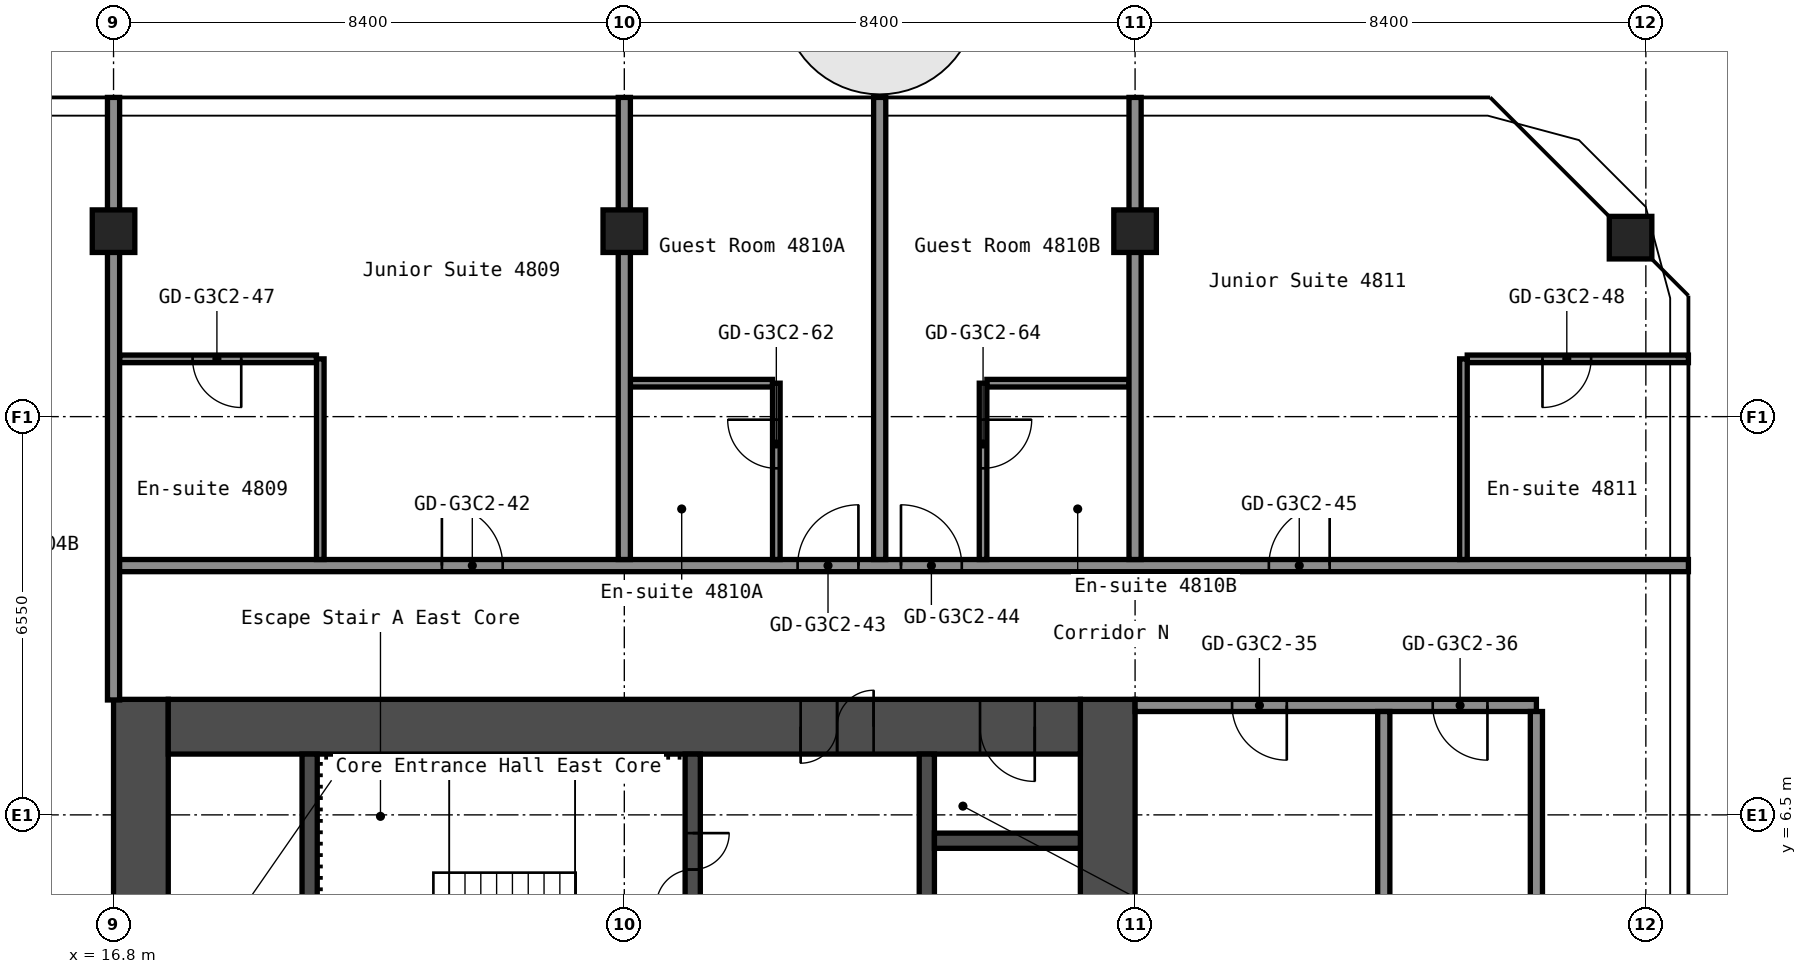
"""IFC4 building model, lengths in metres.
Left out: names, types, materials, properties, quantities, classifications, styles, units other than length and angle.
Written with IfcOpenShell. Run it as: python <this file> out.ifc"""

import sys

from ifc_helpers import new_model, si_unit, direction, frame, frame_2d, origin, origin_2d, place, context, subcontext, project, spatial, rectangle, hollow_rectangle, extrude, element, fill, save


model = new_model("IFC4")
c1 = context("Model", 3, precision=1e-05, world=origin(), true_north=direction((0.0, 1.0)))
c2 = subcontext(c1, "Body", "Model", "MODEL_VIEW")
j1 = project(units=[si_unit("LENGTHUNIT", "METRE"), si_unit("PLANEANGLEUNIT", "RADIAN")], contexts=[c1])
p1 = place(None, origin())
s1 = spatial("IfcSite", under=j1, at=p1, CompositionType="ELEMENT")
p2 = place(p1, origin())
s2 = spatial("IfcBuilding", under=s1, at=p2, CompositionType="ELEMENT")
p3 = place(p2, frame((0.0, 0.0, 169.4)))
s3 = spatial("IfcBuildingStorey", under=s2, at=p3, CompositionType="ELEMENT", Elevation=169.4)
for number, where, z_axis, x_axis in (
    (1, (16.8, 16.1, 0.0), (0.0, 0.0, 1.0), (1.0, 0.0, 0.0)),
    (2, (25.2, 16.1, 0.0), (0.0, 0.0, 1.0), (1.0, 0.0, 0.0)),
    (3, (33.6, 16.1, 0.0), (0.0, 0.0, 1.0), (1.0, 0.0, 0.0)),
    (4, (41.749, 15.994, 0.0), (0.0, 0.0, 1.0), (1.0, 0.0, 0.0)),
):
    element("IfcColumn", number, at=place(p3, frame(where, z_axis=z_axis, x_axis=x_axis)), inside=s3, PredefinedType="COLUMN", context=c2, shape_type="SweptSolid", body=[
        extrude(hollow_rectangle(XDim=0.7, YDim=0.7, WallThickness=0.028, at=origin_2d()), origin(), (0.0, 0.0, 1.0), 2.75),
    ])
p4 = place(p3, frame((17.25, -8.4, 0.0), z_axis=(0.0, 0.0, 1.0), x_axis=(0.0, 1.0, 0.0)))
e5 = element("IfcWall", 5, at=p4, inside=s3, PredefinedType="SHEAR", context=c2, shape_type="SweptSolid", body=[
    extrude(rectangle(XDim=16.8, YDim=0.9, at=frame_2d((8.4, 0.0))), origin(), (0.0, 0.0, 1.0), 2.75),
])
p5 = place(p4, frame((7.1, 0.0, 0.0)))
e6 = element("IfcOpeningElement", 6, at=p5, cuts=e5, PredefinedType="OPENING", context=c2, shape_type="SweptSolid", body=[
    extrude(rectangle(XDim=1.6, YDim=2.1, at=frame_2d((0.8, 1.05))), frame((0.0, 0.46, 0.0), z_axis=(0.0, -1.0, 0.0), x_axis=(1.0, 0.0, 0.0)), (0.0, 0.0, 1.0), 0.92),
])
p6 = place(p3, frame((33.15, -8.4, 0.0), z_axis=(0.0, 0.0, 1.0), x_axis=(0.0, 1.0, 0.0)))
e7 = element("IfcWall", 7, at=p6, inside=s3, PredefinedType="SHEAR", context=c2, shape_type="SweptSolid", body=[
    extrude(rectangle(XDim=16.8, YDim=0.9, at=frame_2d((8.4, 0.0))), origin(), (0.0, 0.0, 1.0), 2.75),
])
p7 = place(p3, frame((17.7, 7.95, 0.0), z_axis=(0.0, 0.0, 1.0), x_axis=(1.0, 0.0, 0.0)))
e8 = element("IfcWall", 8, at=p7, inside=s3, PredefinedType="SHEAR", context=c2, shape_type="SweptSolid", body=[
    extrude(rectangle(XDim=15.0, YDim=0.9, at=frame_2d((7.5, 0.0))), origin(), (0.0, 0.0, 1.0), 2.75),
])
p8 = place(p7, frame((10.4, 0.0, 0.0)))
e9 = element("IfcOpeningElement", 9, at=p8, cuts=e8, PredefinedType="OPENING", context=c2, shape_type="SweptSolid", body=[
    extrude(rectangle(XDim=1.2, YDim=2.1, at=frame_2d((0.6, 1.05))), frame((0.0, 0.46, 0.0), z_axis=(0.0, -1.0, 0.0), x_axis=(1.0, 0.0, 0.0)), (0.0, 0.0, 1.0), 0.92),
])
p9 = place(p7, frame((13.35, 0.0, 0.0)))
e10 = element("IfcOpeningElement", 10, at=p9, cuts=e8, PredefinedType="OPENING", context=c2, shape_type="SweptSolid", body=[
    extrude(rectangle(XDim=0.9, YDim=2.1, at=frame_2d((0.45, 1.05))), frame((0.0, 0.46, 0.0), z_axis=(0.0, -1.0, 0.0), x_axis=(1.0, 0.0, 0.0)), (0.0, 0.0, 1.0), 0.92),
])
p10 = place(p3, frame((20.025, 1.2, 0.0), z_axis=(0.0, 0.0, 1.0), x_axis=(0.0, 1.0, 0.0)))
e11 = element("IfcWall", 11, at=p10, inside=s3, PredefinedType="SHEAR", context=c2, shape_type="SweptSolid", body=[
    extrude(rectangle(XDim=6.3, YDim=0.25, at=frame_2d((3.15, 0.0))), origin(), (0.0, 0.0, 1.0), 2.75),
])
p11 = place(p3, frame((26.325, 3.75, 0.0), z_axis=(0.0, 0.0, 1.0), x_axis=(0.0, 1.0, 0.0)))
e12 = element("IfcWall", 12, at=p11, inside=s3, PredefinedType="SHEAR", context=c2, shape_type="SweptSolid", body=[
    extrude(rectangle(XDim=3.75, YDim=0.25, at=frame_2d((1.875, 0.0))), origin(), (0.0, 0.0, 1.0), 2.75),
])
p12 = place(p11, frame((1.25, 0.0, 0.0)))
e13 = element("IfcOpeningElement", 13, at=p12, cuts=e12, PredefinedType="OPENING", context=c2, shape_type="SweptSolid", body=[
    extrude(rectangle(XDim=1.2, YDim=2.1, at=frame_2d((0.6, 1.05))), frame((0.0, 0.135, 0.0), z_axis=(0.0, -1.0, 0.0), x_axis=(1.0, 0.0, 0.0)), (0.0, 0.0, 1.0), 0.27),
])
p13 = place(p3, frame((30.175, 1.45, 0.0), z_axis=(0.0, 0.0, 1.0), x_axis=(0.0, 1.0, 0.0)))
e14 = element("IfcWall", 14, at=p13, inside=s3, PredefinedType="SHEAR", context=c2, shape_type="SweptSolid", body=[
    extrude(rectangle(XDim=6.05, YDim=0.25, at=frame_2d((3.025, 0.0))), origin(), (0.0, 0.0, 1.0), 2.75),
])
p14 = place(p13, frame((2.625, 0.0, 0.0)))
e15 = element("IfcOpeningElement", 15, at=p14, cuts=e14, PredefinedType="OPENING", context=c2, shape_type="SweptSolid", body=[
    extrude(rectangle(XDim=1.1, YDim=2.1, at=frame_2d((0.55, 1.05))), frame((0.0, 0.135, 0.0), z_axis=(0.0, -1.0, 0.0), x_axis=(1.0, 0.0, 0.0)), (0.0, 0.0, 1.0), 0.27),
])
p15 = place(p3, frame((30.3, 6.075, 0.0), z_axis=(0.0, 0.0, 1.0), x_axis=(1.0, 0.0, 0.0)))
e16 = element("IfcWall", 16, at=p15, inside=s3, PredefinedType="SHEAR", context=c2, shape_type="SweptSolid", body=[
    extrude(rectangle(XDim=2.4, YDim=0.25, at=frame_2d((1.2, 0.0))), origin(), (0.0, 0.0, 1.0), 2.75),
])
p16 = place(p3, frame((33.6, 8.3, 0.0), z_axis=(0.0, 0.0, 1.0), x_axis=(1.0, 0.0, 0.0)))
e17 = element("IfcWall", 17, at=p16, inside=s3, PredefinedType="PARTITIONING", context=c2, shape_type="SweptSolid", body=[
    extrude(rectangle(XDim=6.6, YDim=0.2, at=frame_2d((3.3, 0.0))), origin(), (0.0, 0.0, 1.0), 2.75),
])
p17 = place(p16, frame((1.595, 0.0, 0.0)))
e18 = element("IfcOpeningElement", 18, at=p17, cuts=e17, PredefinedType="OPENING", context=c2, shape_type="SweptSolid", body=[
    extrude(rectangle(XDim=0.9, YDim=2.1, at=frame_2d((0.45, 1.05))), frame((0.0, 0.11, 0.0), z_axis=(0.0, -1.0, 0.0), x_axis=(1.0, 0.0, 0.0)), (0.0, 0.0, 1.0), 0.22),
])
p18 = place(p16, frame((4.895, 0.0, 0.0)))
e19 = element("IfcOpeningElement", 19, at=p18, cuts=e17, PredefinedType="OPENING", context=c2, shape_type="SweptSolid", body=[
    extrude(rectangle(XDim=0.9, YDim=2.1, at=frame_2d((0.45, 1.05))), frame((0.0, 0.11, 0.0), z_axis=(0.0, -1.0, 0.0), x_axis=(1.0, 0.0, 0.0)), (0.0, 0.0, 1.0), 0.22),
])
p19 = place(p3, frame((16.8, 10.6, 0.0), z_axis=(0.0, 0.0, 1.0), x_axis=(1.0, 0.0, 0.0)))
e20 = element("IfcWall", 20, at=p19, inside=s3, PredefinedType="PARTITIONING", context=c2, shape_type="SweptSolid", body=[
    extrude(rectangle(XDim=25.9, YDim=0.2, at=frame_2d((12.95, 0.0))), origin(), (0.0, 0.0, 1.0), 2.75),
])
p20 = place(p19, frame((5.4, 0.0, 0.0)))
e21 = element("IfcOpeningElement", 21, at=p20, cuts=e20, PredefinedType="OPENING", context=c2, shape_type="SweptSolid", body=[
    extrude(rectangle(XDim=1.0, YDim=2.1, at=frame_2d((0.5, 1.05))), frame((0.0, 0.11, 0.0), z_axis=(0.0, -1.0, 0.0), x_axis=(1.0, 0.0, 0.0)), (0.0, 0.0, 1.0), 0.22),
])
p21 = place(p19, frame((11.25, 0.0, 0.0)))
e22 = element("IfcOpeningElement", 22, at=p21, cuts=e20, PredefinedType="OPENING", context=c2, shape_type="SweptSolid", body=[
    extrude(rectangle(XDim=1.0, YDim=2.1, at=frame_2d((0.5, 1.05))), frame((0.0, 0.11, 0.0), z_axis=(0.0, -1.0, 0.0), x_axis=(1.0, 0.0, 0.0)), (0.0, 0.0, 1.0), 0.22),
])
p22 = place(p19, frame((12.95, 0.0, 0.0)))
e23 = element("IfcOpeningElement", 23, at=p22, cuts=e20, PredefinedType="OPENING", context=c2, shape_type="SweptSolid", body=[
    extrude(rectangle(XDim=1.0, YDim=2.1, at=frame_2d((0.5, 1.05))), frame((0.0, 0.11, 0.0), z_axis=(0.0, -1.0, 0.0), x_axis=(1.0, 0.0, 0.0)), (0.0, 0.0, 1.0), 0.22),
])
p23 = place(p19, frame((19.0, 0.0, 0.0)))
e24 = element("IfcOpeningElement", 24, at=p23, cuts=e20, PredefinedType="OPENING", context=c2, shape_type="SweptSolid", body=[
    extrude(rectangle(XDim=1.0, YDim=2.1, at=frame_2d((0.5, 1.05))), frame((0.0, 0.11, 0.0), z_axis=(0.0, -1.0, 0.0), x_axis=(1.0, 0.0, 0.0)), (0.0, 0.0, 1.0), 0.22),
])
for number, where, z_axis, x_axis in (
    (25, (25.3, 13.6, 0.0), (0.0, 0.0, 1.0), (1.0, 0.0, 0.0)),
    (26, (31.163, 13.6, 0.0), (0.0, 0.0, 1.0), (1.0, 0.0, 0.0)),
):
    element("IfcWall", number, at=place(p3, frame(where, z_axis=z_axis, x_axis=x_axis)), inside=s3, PredefinedType="PARTITIONING", context=c2, shape_type="SweptSolid", body=[
        extrude(rectangle(XDim=2.337, YDim=0.125, at=frame_2d((1.169, 0.0))), origin(), (0.0, 0.0, 1.0), 2.75),
    ])
p24 = place(p3, frame((16.9, 14.0, 0.0), z_axis=(0.0, 0.0, 1.0), x_axis=(1.0, 0.0, 0.0)))
e27 = element("IfcWall", 27, at=p24, inside=s3, PredefinedType="PARTITIONING", context=c2, shape_type="SweptSolid", body=[
    extrude(rectangle(XDim=3.238, YDim=0.125, at=frame_2d((1.619, 0.0))), origin(), (0.0, 0.0, 1.0), 2.75),
])
p25 = place(p24, frame((1.2, 0.0, 0.0)))
e28 = element("IfcOpeningElement", 28, at=p25, cuts=e27, PredefinedType="OPENING", context=c2, shape_type="SweptSolid", body=[
    extrude(rectangle(XDim=0.8, YDim=2.1, at=frame_2d((0.4, 1.05))), frame((0.0, 0.073, 0.0), z_axis=(0.0, -1.0, 0.0), x_axis=(1.0, 0.0, 0.0)), (0.0, 0.0, 1.0), 0.145),
])
p26 = place(p3, frame((39.062, 14.0, 0.0), z_axis=(0.0, 0.0, 1.0), x_axis=(1.0, 0.0, 0.0)))
e29 = element("IfcWall", 29, at=p26, inside=s3, PredefinedType="PARTITIONING", context=c2, shape_type="SweptSolid", body=[
    extrude(rectangle(XDim=3.637, YDim=0.125, at=frame_2d((1.819, 0.0))), origin(), (0.0, 0.0, 1.0), 2.75),
])
p27 = place(p26, frame((1.238, 0.0, 0.0)))
e30 = element("IfcOpeningElement", 30, at=p27, cuts=e29, PredefinedType="OPENING", context=c2, shape_type="SweptSolid", body=[
    extrude(rectangle(XDim=0.8, YDim=2.1, at=frame_2d((0.4, 1.05))), frame((0.0, 0.073, 0.0), z_axis=(0.0, -1.0, 0.0), x_axis=(1.0, 0.0, 0.0)), (0.0, 0.0, 1.0), 0.145),
])
p28 = place(p3, frame((16.8, 8.39, 0.0), z_axis=(0.0, 0.0, 1.0), x_axis=(0.0, 1.0, 0.0)))
e31 = element("IfcWall", 31, at=p28, inside=s3, PredefinedType="PARTITIONING", context=c2, shape_type="SweptSolid", body=[
    extrude(rectangle(XDim=9.91, YDim=0.2, at=frame_2d((4.955, 0.0))), origin(), (0.0, 0.0, 1.0), 2.75),
])
p29 = place(p3, frame((20.2, 10.7, 0.0), z_axis=(0.0, 0.0, 1.0), x_axis=(0.0, 1.0, 0.0)))
e32 = element("IfcWall", 32, at=p29, inside=s3, PredefinedType="PARTITIONING", context=c2, shape_type="SweptSolid", body=[
    extrude(rectangle(XDim=3.3, YDim=0.125, at=frame_2d((1.65, 0.0))), origin(), (0.0, 0.0, 1.0), 2.75),
])
p30 = place(p3, frame((25.2, 10.7, 0.0), z_axis=(0.0, 0.0, 1.0), x_axis=(0.0, 1.0, 0.0)))
e33 = element("IfcWall", 33, at=p30, inside=s3, PredefinedType="PARTITIONING", context=c2, shape_type="SweptSolid", body=[
    extrude(rectangle(XDim=7.6, YDim=0.2, at=frame_2d((3.8, 0.0))), origin(), (0.0, 0.0, 1.0), 2.75),
])
p31 = place(p3, frame((27.7, 10.7, 0.0), z_axis=(0.0, 0.0, 1.0), x_axis=(0.0, 1.0, 0.0)))
e34 = element("IfcWall", 34, at=p31, inside=s3, PredefinedType="PARTITIONING", context=c2, shape_type="SweptSolid", body=[
    extrude(rectangle(XDim=2.9, YDim=0.125, at=frame_2d((1.45, 0.0))), origin(), (0.0, 0.0, 1.0), 2.75),
])
p32 = place(p31, frame((1.5, 0.0, 0.0)))
e35 = element("IfcOpeningElement", 35, at=p32, cuts=e34, PredefinedType="OPENING", context=c2, shape_type="SweptSolid", body=[
    extrude(rectangle(XDim=0.8, YDim=2.1, at=frame_2d((0.4, 1.05))), frame((0.0, 0.073, 0.0), z_axis=(0.0, -1.0, 0.0), x_axis=(1.0, 0.0, 0.0)), (0.0, 0.0, 1.0), 0.145),
])
p33 = place(p3, frame((29.4, 10.7, 0.0), z_axis=(0.0, 0.0, 1.0), x_axis=(0.0, 1.0, 0.0)))
e36 = element("IfcWall", 36, at=p33, inside=s3, PredefinedType="PARTITIONING", context=c2, shape_type="SweptSolid", body=[
    extrude(rectangle(XDim=7.6, YDim=0.2, at=frame_2d((3.8, 0.0))), origin(), (0.0, 0.0, 1.0), 2.75),
])
p34 = place(p3, frame((31.1, 10.7, 0.0), z_axis=(0.0, 0.0, 1.0), x_axis=(0.0, 1.0, 0.0)))
e37 = element("IfcWall", 37, at=p34, inside=s3, PredefinedType="PARTITIONING", context=c2, shape_type="SweptSolid", body=[
    extrude(rectangle(XDim=2.9, YDim=0.125, at=frame_2d((1.45, 0.0))), origin(), (0.0, 0.0, 1.0), 2.75),
])
p35 = place(p34, frame((1.5, 0.0, 0.0)))
e38 = element("IfcOpeningElement", 38, at=p35, cuts=e37, PredefinedType="OPENING", context=c2, shape_type="SweptSolid", body=[
    extrude(rectangle(XDim=0.8, YDim=2.1, at=frame_2d((0.4, 1.05))), frame((0.0, 0.073, 0.0), z_axis=(0.0, -1.0, 0.0), x_axis=(1.0, 0.0, 0.0)), (0.0, 0.0, 1.0), 0.145),
])
p36 = place(p3, frame((33.6, 10.7, 0.0), z_axis=(0.0, 0.0, 1.0), x_axis=(0.0, 1.0, 0.0)))
e39 = element("IfcWall", 39, at=p36, inside=s3, PredefinedType="PARTITIONING", context=c2, shape_type="SweptSolid", body=[
    extrude(rectangle(XDim=7.6, YDim=0.2, at=frame_2d((3.8, 0.0))), origin(), (0.0, 0.0, 1.0), 2.75),
])
p37 = place(p3, frame((37.69, 0.0, 0.0), z_axis=(0.0, 0.0, 1.0), x_axis=(0.0, 1.0, 0.0)))
e40 = element("IfcWall", 40, at=p37, inside=s3, PredefinedType="PARTITIONING", context=c2, shape_type="SweptSolid", body=[
    extrude(rectangle(XDim=8.2, YDim=0.2, at=frame_2d((4.1, 0.0))), origin(), (0.0, 0.0, 1.0), 2.75),
])
p38 = place(p3, frame((39.0, 10.7, 0.0), z_axis=(0.0, 0.0, 1.0), x_axis=(0.0, 1.0, 0.0)))
e41 = element("IfcWall", 41, at=p38, inside=s3, PredefinedType="PARTITIONING", context=c2, shape_type="SweptSolid", body=[
    extrude(rectangle(XDim=3.3, YDim=0.125, at=frame_2d((1.65, 0.0))), origin(), (0.0, 0.0, 1.0), 2.75),
])
p39 = place(p3, frame((40.2, -8.2, 0.0), z_axis=(0.0, 0.0, 1.0), x_axis=(0.0, 1.0, 0.0)))
e42 = element("IfcWall", 42, at=p39, inside=s3, PredefinedType="PARTITIONING", context=c2, shape_type="SweptSolid", body=[
    extrude(rectangle(XDim=16.4, YDim=0.2, at=frame_2d((8.2, 0.0))), origin(), (0.0, 0.0, 1.0), 2.75),
])
p40 = place(p8, origin())
e43 = element("IfcDoor", 43, at=p40, inside=s3, OperationType="DOUBLE_DOOR_SINGLE_SWING", PredefinedType="DOOR", context=c2, shape_type="SweptSolid", body=[
    extrude(rectangle(XDim=1.2, YDim=2.1, at=frame_2d((0.6, 1.05))), frame((0.0, 0.025, 0.0), z_axis=(0.0, -1.0, 0.0), x_axis=(1.0, 0.0, 0.0)), (0.0, 0.0, 1.0), 0.05),
])
fill(e9, e43)
p41 = place(p9, origin())
e44 = element("IfcDoor", 44, at=p41, inside=s3, OperationType="SINGLE_SWING_RIGHT", PredefinedType="DOOR", context=c2, shape_type="SweptSolid", body=[
    extrude(rectangle(XDim=0.9, YDim=2.1, at=frame_2d((0.45, 1.05))), frame((0.0, 0.025, 0.0), z_axis=(0.0, -1.0, 0.0), x_axis=(1.0, 0.0, 0.0)), (0.0, 0.0, 1.0), 0.05),
])
fill(e10, e44)
p42 = place(p12, origin())
e45 = element("IfcDoor", 45, at=p42, inside=s3, OperationType="DOUBLE_DOOR_SINGLE_SWING", PredefinedType="DOOR", context=c2, shape_type="SweptSolid", body=[
    extrude(rectangle(XDim=1.2, YDim=2.1, at=frame_2d((0.6, 1.05))), frame((0.0, 0.025, 0.0), z_axis=(0.0, -1.0, 0.0), x_axis=(1.0, 0.0, 0.0)), (0.0, 0.0, 1.0), 0.05),
])
fill(e13, e45)
p43 = place(p17, origin())
e46 = element("IfcDoor", 46, at=p43, inside=s3, OperationType="SINGLE_SWING_RIGHT", PredefinedType="DOOR", context=c2, shape_type="SweptSolid", body=[
    extrude(rectangle(XDim=0.9, YDim=2.1, at=frame_2d((0.45, 1.05))), frame((0.0, 0.025, 0.0), z_axis=(0.0, -1.0, 0.0), x_axis=(1.0, 0.0, 0.0)), (0.0, 0.0, 1.0), 0.05),
])
fill(e18, e46)
p44 = place(p18, origin())
e47 = element("IfcDoor", 47, at=p44, inside=s3, OperationType="SINGLE_SWING_RIGHT", PredefinedType="DOOR", context=c2, shape_type="SweptSolid", body=[
    extrude(rectangle(XDim=0.9, YDim=2.1, at=frame_2d((0.45, 1.05))), frame((0.0, 0.025, 0.0), z_axis=(0.0, -1.0, 0.0), x_axis=(1.0, 0.0, 0.0)), (0.0, 0.0, 1.0), 0.05),
])
fill(e19, e47)
p45 = place(p20, origin())
e48 = element("IfcDoor", 48, at=p45, inside=s3, OperationType="SINGLE_SWING_RIGHT", PredefinedType="DOOR", context=c2, shape_type="SweptSolid", body=[
    extrude(rectangle(XDim=1.0, YDim=2.1, at=frame_2d((0.5, 1.05))), frame((0.0, 0.025, 0.0), z_axis=(0.0, -1.0, 0.0), x_axis=(1.0, 0.0, 0.0)), (0.0, 0.0, 1.0), 0.05),
])
fill(e21, e48)
p46 = place(p21, origin())
e49 = element("IfcDoor", 49, at=p46, inside=s3, OperationType="SINGLE_SWING_LEFT", PredefinedType="DOOR", context=c2, shape_type="SweptSolid", body=[
    extrude(rectangle(XDim=1.0, YDim=2.1, at=frame_2d((0.5, 1.05))), frame((0.0, 0.025, 0.0), z_axis=(0.0, -1.0, 0.0), x_axis=(1.0, 0.0, 0.0)), (0.0, 0.0, 1.0), 0.05),
])
fill(e22, e49)
p47 = place(p22, origin())
e50 = element("IfcDoor", 50, at=p47, inside=s3, OperationType="SINGLE_SWING_RIGHT", PredefinedType="DOOR", context=c2, shape_type="SweptSolid", body=[
    extrude(rectangle(XDim=1.0, YDim=2.1, at=frame_2d((0.5, 1.05))), frame((0.0, 0.025, 0.0), z_axis=(0.0, -1.0, 0.0), x_axis=(1.0, 0.0, 0.0)), (0.0, 0.0, 1.0), 0.05),
])
fill(e23, e50)
p48 = place(p23, origin())
e51 = element("IfcDoor", 51, at=p48, inside=s3, OperationType="SINGLE_SWING_LEFT", PredefinedType="DOOR", context=c2, shape_type="SweptSolid", body=[
    extrude(rectangle(XDim=1.0, YDim=2.1, at=frame_2d((0.5, 1.05))), frame((0.0, 0.025, 0.0), z_axis=(0.0, -1.0, 0.0), x_axis=(1.0, 0.0, 0.0)), (0.0, 0.0, 1.0), 0.05),
])
fill(e24, e51)
p49 = place(p25, origin())
e52 = element("IfcDoor", 52, at=p49, inside=s3, OperationType="SINGLE_SWING_RIGHT", PredefinedType="DOOR", context=c2, shape_type="SweptSolid", body=[
    extrude(rectangle(XDim=0.8, YDim=2.1, at=frame_2d((0.4, 1.05))), frame((0.0, 0.025, 0.0), z_axis=(0.0, -1.0, 0.0), x_axis=(1.0, 0.0, 0.0)), (0.0, 0.0, 1.0), 0.05),
])
fill(e28, e52)
p50 = place(p27, origin())
e53 = element("IfcDoor", 53, at=p50, inside=s3, OperationType="SINGLE_SWING_LEFT", PredefinedType="DOOR", context=c2, shape_type="SweptSolid", body=[
    extrude(rectangle(XDim=0.8, YDim=2.1, at=frame_2d((0.4, 1.05))), frame((0.0, 0.025, 0.0), z_axis=(0.0, -1.0, 0.0), x_axis=(1.0, 0.0, 0.0)), (0.0, 0.0, 1.0), 0.05),
])
fill(e30, e53)
p51 = place(p32, origin())
e54 = element("IfcDoor", 54, at=p51, inside=s3, OperationType="SINGLE_SWING_LEFT", PredefinedType="DOOR", context=c2, shape_type="SweptSolid", body=[
    extrude(rectangle(XDim=0.8, YDim=2.1, at=frame_2d((0.4, 1.05))), frame((0.0, 0.025, 0.0), z_axis=(0.0, -1.0, 0.0), x_axis=(1.0, 0.0, 0.0)), (0.0, 0.0, 1.0), 0.05),
])
fill(e35, e54)
p52 = place(p35, origin())
e55 = element("IfcDoor", 55, at=p52, inside=s3, OperationType="SINGLE_SWING_RIGHT", PredefinedType="DOOR", context=c2, shape_type="SweptSolid", body=[
    extrude(rectangle(XDim=0.8, YDim=2.1, at=frame_2d((0.4, 1.05))), frame((0.0, 0.025, 0.0), z_axis=(0.0, -1.0, 0.0), x_axis=(1.0, 0.0, 0.0)), (0.0, 0.0, 1.0), 0.05),
])
fill(e38, e55)
save(model, sys.argv[1])
